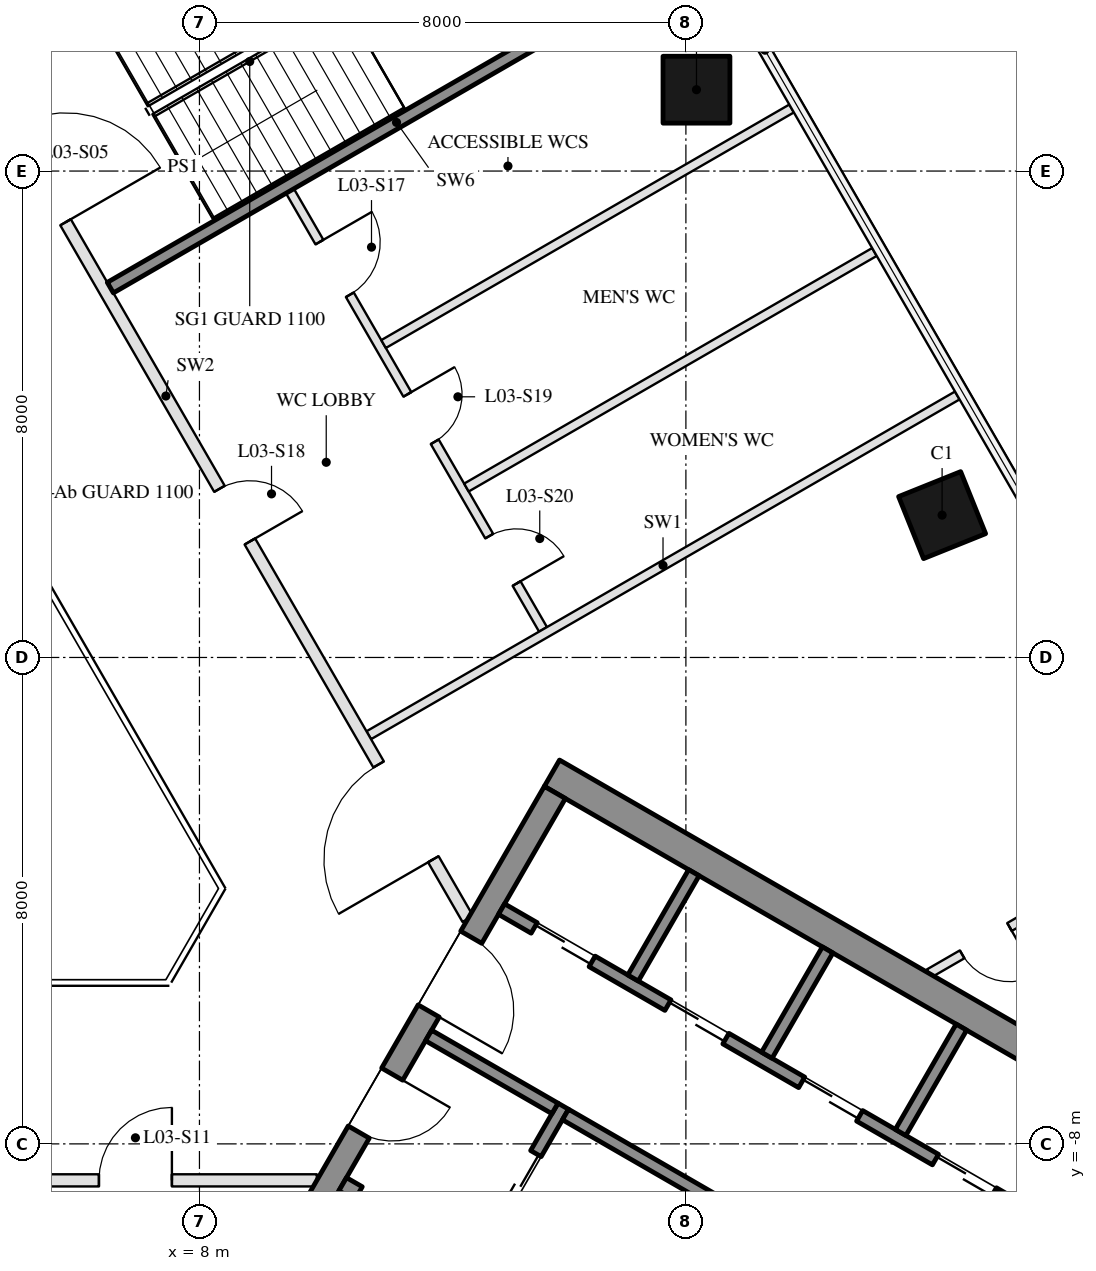
"""IFC4 building model, lengths in metres.
Left out: names, types, materials, properties, quantities, classifications, styles, units other than length and angle.
Written with IfcOpenShell. Run it as: python <this file> out.ifc"""

import sys

from ifc_helpers import new_model, si_unit, direction, frame, frame_2d, origin, origin_2d, place, context, subcontext, project, spatial, rectangle, hollow_rectangle, extrude, boolean, halfspace, element, fill, save


model = new_model("IFC4")
c1 = context("Model", 3, precision=1e-05, world=origin(), true_north=direction((0.0, 1.0)))
c2 = subcontext(c1, "Body", "Model", "MODEL_VIEW")
j1 = project(units=[si_unit("LENGTHUNIT", "METRE"), si_unit("PLANEANGLEUNIT", "RADIAN")], contexts=[c1])
p1 = place(None, origin())
s1 = spatial("IfcSite", under=j1, at=p1, CompositionType="ELEMENT")
p2 = place(p1, origin())
s2 = spatial("IfcBuilding", under=s1, at=p2, CompositionType="ELEMENT")
p3 = place(p2, frame((0.0, 0.0, 23.5)))
s3 = spatial("IfcBuildingStorey", under=s2, at=p3, CompositionType="ELEMENT", Elevation=23.5)
p4 = place(p3, frame((20.214, 2.341, 0.0), z_axis=(-0.055770669369, -0.007946345373, 0.998411983118), x_axis=(0.499656252381, -0.865968742186, 0.021018254285)))
e1 = element("IfcColumn", 1, at=p4, inside=s3, PredefinedType="COLUMN", context=c2, shape_type="SweptSolid", body=[
    boolean("DIFFERENCE", boolean("DIFFERENCE", extrude(hollow_rectangle(XDim=1.1, YDim=1.1, WallThickness=0.05, at=origin_2d()), origin(), (0.0, 0.0, 1.0), 5.008), halfspace(frame((0.0, 0.0, 0.014), z_axis=(0.0, 0.0, 1.0), x_axis=(1.0, 0.0, 0.0)), True)), halfspace(frame((0.0, 0.0, 4.997), z_axis=(0.0, 0.0, 1.0), x_axis=(1.0, 0.0, 0.0)), False)),
])
p5 = place(p3, frame((16.174, 9.338, 0.0), z_axis=(-0.045250647617, -0.026087388443, 0.99863498189), x_axis=(0.499528531793, -0.866297435009, 4.558094e-06)))
e2 = element("IfcColumn", 2, at=p5, inside=s3, PredefinedType="COLUMN", context=c2, shape_type="SweptSolid", body=[
    boolean("DIFFERENCE", boolean("DIFFERENCE", extrude(hollow_rectangle(XDim=1.1, YDim=1.1, WallThickness=0.05, at=origin_2d()), origin(), (0.0, 0.0, 1.0), 5.007), halfspace(frame((0.0, 0.0, 0.013), z_axis=(0.0, 0.0, 1.0), x_axis=(1.0, 0.0, 0.0)), True)), halfspace(frame((0.0, 0.0, 4.996), z_axis=(0.0, 0.0, 1.0), x_axis=(1.0, 0.0, 0.0)), False)),
])
p6 = place(p3, frame((13.797, -1.903, 0.0), z_axis=(0.0, 0.0, 1.0), x_axis=(0.866025760136, -0.499999382781, 0.0)))
e3 = element("IfcWall", 3, at=p6, inside=s3, PredefinedType="SHEAR", context=c2, shape_type="SweptSolid", body=[
    extrude(rectangle(XDim=15.542, YDim=0.5, at=frame_2d((7.771, 0.0))), origin(), (0.0, 0.0, 1.0), 4.7),
])
p7 = place(p3, frame((8.845, -10.88, 0.0), z_axis=(0.0, 0.0, 1.0), x_axis=(0.500004234368, 0.866022959057, 0.0)))
e4 = element("IfcWall", 4, at=p7, inside=s3, PredefinedType="SHEAR", context=c2, shape_type="SweptSolid", body=[
    extrude(rectangle(XDim=10.0, YDim=0.4, at=frame_2d((5.0, 0.0))), origin(), (0.0, 0.0, 1.0), 4.7),
])
p8 = place(p7, frame((3.55, 0.0, 0.0)))
e5 = element("IfcOpeningElement", 5, at=p8, cuts=e4, PredefinedType="OPENING", context=c2, shape_type="SweptSolid", body=[
    extrude(rectangle(XDim=1.1, YDim=2.1, at=frame_2d((0.55, 1.05))), frame((0.0, 0.21, 0.0), z_axis=(0.0, -1.0, 0.0), x_axis=(1.0, 0.0, 0.0)), (0.0, 0.0, 1.0), 0.42),
])
p9 = place(p7, frame((5.85, 0.0, 0.0)))
e6 = element("IfcOpeningElement", 6, at=p9, cuts=e4, PredefinedType="OPENING", context=c2, shape_type="SweptSolid", body=[
    extrude(rectangle(XDim=1.4, YDim=2.1, at=frame_2d((0.7, 1.05))), frame((0.0, 0.21, 0.0), z_axis=(0.0, -1.0, 0.0), x_axis=(1.0, 0.0, 0.0)), (0.0, 0.0, 1.0), 0.42),
])
p10 = place(p3, frame((10.356, -8.664, 0.0), z_axis=(0.0, 0.0, 1.0), x_axis=(0.866028629588, -0.499994412703, 0.0)))
e7 = element("IfcWall", 7, at=p10, inside=s3, PredefinedType="SHEAR", context=c2, shape_type="SweptSolid", body=[
    extrude(rectangle(XDim=6.45, YDim=0.25, at=frame_2d((3.225, 0.0))), origin(), (0.0, 0.0, 1.0), 4.7),
])
p11 = place(p10, frame((0.3, 0.0, 0.0)))
e8 = element("IfcOpeningElement", 8, at=p11, cuts=e7, PredefinedType="OPENING", context=c2, shape_type="SweptSolid", body=[
    extrude(rectangle(XDim=1.0, YDim=2.1, at=frame_2d((0.5, 1.05))), frame((0.0, 0.135, 0.0), z_axis=(0.0, -1.0, 0.0), x_axis=(1.0, 0.0, 0.0)), (0.0, 0.0, 1.0), 0.27),
])
p12 = place(p3, frame((12.583, -9.805, 0.0), z_axis=(0.0, 0.0, 1.0), x_axis=(0.49994636267, 0.866056369097, 0.0)))
e9 = element("IfcWall", 9, at=p12, inside=s3, PredefinedType="SHEAR", context=c2, shape_type="SweptSolid", body=[
    extrude(rectangle(XDim=2.8, YDim=0.2, at=frame_2d((1.4, 0.0))), origin(), (0.0, 0.0, 1.0), 4.7),
])
p13 = place(p12, frame((0.7, 0.0, 0.0)))
e10 = element("IfcOpeningElement", 10, at=p13, cuts=e9, PredefinedType="OPENING", context=c2, shape_type="SweptSolid", body=[
    extrude(rectangle(XDim=1.2, YDim=2.1, at=frame_2d((0.6, 1.05))), frame((0.0, 0.11, 0.0), z_axis=(0.0, -1.0, 0.0), x_axis=(1.0, 0.0, 0.0)), (0.0, 0.0, 1.0), 0.22),
])
p14 = place(p3, frame((11.768, -6.217, 0.0), z_axis=(0.0, 0.0, 1.0), x_axis=(0.866050077142, -0.499957262057, 0.0)))
e11 = element("IfcWall", 11, at=p14, inside=s3, PredefinedType="SHEAR", context=c2, shape_type="SweptSolid", body=[
    extrude(rectangle(XDim=2.4, YDim=0.2, at=frame_2d((1.2, 0.0))), origin(), (0.0, 0.0, 1.0), 4.7),
])
p15 = place(p3, frame((14.02, -7.517, 0.0), z_axis=(0.0, 0.0, 1.0), x_axis=(0.866034573852, -0.49998411664, 0.0)))
e12 = element("IfcWall", 12, at=p15, inside=s3, PredefinedType="SHEAR", context=c2, shape_type="SweptSolid", body=[
    extrude(rectangle(XDim=2.8, YDim=0.2, at=frame_2d((1.4, 0.0))), origin(), (0.0, 0.0, 1.0), 4.7),
])
p16 = place(p3, frame((12.968, -4.138, 0.0), z_axis=(0.0, 0.0, 1.0), x_axis=(0.866028328073, -0.49999493495, 0.0)))
e13 = element("IfcWall", 13, at=p16, inside=s3, PredefinedType="SHEAR", context=c2, shape_type="SweptSolid", body=[
    extrude(rectangle(XDim=10.16, YDim=0.2, at=frame_2d((5.08, 0.0))), origin(), (0.0, 0.0, 1.0), 4.7),
])
p17 = place(p16, frame((0.62, 0.0, 0.0)))
e14 = element("IfcOpeningElement", 14, at=p17, cuts=e13, PredefinedType="OPENING", context=c2, shape_type="SweptSolid", body=[
    extrude(rectangle(XDim=1.1, YDim=2.1, at=frame_2d((0.55, 1.05))), frame((0.0, 0.11, 0.0), z_axis=(0.0, -1.0, 0.0), x_axis=(1.0, 0.0, 0.0)), (0.0, 0.0, 1.0), 0.22),
])
p18 = place(p16, frame((3.16, 0.0, 0.0)))
e15 = element("IfcOpeningElement", 15, at=p18, cuts=e13, PredefinedType="OPENING", context=c2, shape_type="SweptSolid", body=[
    extrude(rectangle(XDim=1.1, YDim=2.1, at=frame_2d((0.55, 1.05))), frame((0.0, 0.11, 0.0), z_axis=(0.0, -1.0, 0.0), x_axis=(1.0, 0.0, 0.0)), (0.0, 0.0, 1.0), 0.22),
])
p19 = place(p16, frame((5.7, 0.0, 0.0)))
e16 = element("IfcOpeningElement", 16, at=p19, cuts=e13, PredefinedType="OPENING", context=c2, shape_type="SweptSolid", body=[
    extrude(rectangle(XDim=1.1, YDim=2.1, at=frame_2d((0.55, 1.05))), frame((0.0, 0.11, 0.0), z_axis=(0.0, -1.0, 0.0), x_axis=(1.0, 0.0, 0.0)), (0.0, 0.0, 1.0), 0.22),
])
p20 = place(p16, frame((8.24, 0.0, 0.0)))
e17 = element("IfcOpeningElement", 17, at=p20, cuts=e13, PredefinedType="OPENING", context=c2, shape_type="SweptSolid", body=[
    extrude(rectangle(XDim=1.1, YDim=2.1, at=frame_2d((0.55, 1.05))), frame((0.0, 0.11, 0.0), z_axis=(0.0, -1.0, 0.0), x_axis=(1.0, 0.0, 0.0)), (0.0, 0.0, 1.0), 0.22),
])
for number, where, z_axis, x_axis in (
    (18, (15.131, -5.272, 0.0), (0.0, 0.0, 1.0), (0.5, 0.866, 0.0)),
    (19, (17.331, -6.542, 0.0), (0.0, 0.0, 1.0), (0.5, 0.866, 0.0)),
    (20, (19.531, -7.812, 0.0), (0.0, 0.0, 1.0), (0.5, 0.866, 0.0)),
):
    element("IfcWall", number, at=place(p3, frame(where, z_axis=z_axis, x_axis=x_axis)), inside=s3, PredefinedType="SHEAR", context=c2, shape_type="SweptSolid", body=[
        extrude(rectangle(XDim=2.0, YDim=0.2, at=frame_2d((1.0, 0.0))), origin(), (0.0, 0.0, 1.0), 4.7),
    ])
p21 = place(p3, frame((-9.93, -8.6, 0.0), z_axis=(0.0, 0.0, 1.0), x_axis=(1.0, 0.0, 0.0)))
e21 = element("IfcWall", 21, at=p21, inside=s3, PredefinedType="PARTITIONING", context=c2, shape_type="SweptSolid", body=[
    extrude(rectangle(XDim=19.861, YDim=0.2, at=frame_2d((9.93, 0.0))), origin(), (0.0, 0.0, 1.0), 3.91),
])
p22 = place(p21, frame((1.734, 0.0, 0.0)))
e22 = element("IfcOpeningElement", 22, at=p22, cuts=e21, PredefinedType="OPENING", context=c2, shape_type="SweptSolid", body=[
    extrude(rectangle(XDim=1.0, YDim=2.1, at=frame_2d((0.5, 1.05))), frame((0.0, 0.11, 0.0), z_axis=(0.0, -1.0, 0.0), x_axis=(1.0, 0.0, 0.0)), (0.0, 0.0, 1.0), 0.22),
])
p23 = place(p21, frame((6.081, 0.0, 0.0)))
e23 = element("IfcOpeningElement", 23, at=p23, cuts=e21, PredefinedType="OPENING", context=c2, shape_type="SweptSolid", body=[
    extrude(rectangle(XDim=1.0, YDim=2.1, at=frame_2d((0.5, 1.05))), frame((0.0, 0.11, 0.0), z_axis=(0.0, -1.0, 0.0), x_axis=(1.0, 0.0, 0.0)), (0.0, 0.0, 1.0), 0.22),
])
p24 = place(p21, frame((10.831, 0.0, 0.0)))
e24 = element("IfcOpeningElement", 24, at=p24, cuts=e21, PredefinedType="OPENING", context=c2, shape_type="SweptSolid", body=[
    extrude(rectangle(XDim=1.0, YDim=2.1, at=frame_2d((0.5, 1.05))), frame((0.0, 0.11, 0.0), z_axis=(0.0, -1.0, 0.0), x_axis=(1.0, 0.0, 0.0)), (0.0, 0.0, 1.0), 0.22),
])
p25 = place(p21, frame((16.278, 0.0, 0.0)))
e25 = element("IfcOpeningElement", 25, at=p25, cuts=e21, PredefinedType="OPENING", context=c2, shape_type="SweptSolid", body=[
    extrude(rectangle(XDim=1.2, YDim=2.1, at=frame_2d((0.6, 1.05))), frame((0.0, 0.11, 0.0), z_axis=(0.0, -1.0, 0.0), x_axis=(1.0, 0.0, 0.0)), (0.0, 0.0, 1.0), 0.22),
])
p26 = place(p3, frame((13.65, 0.462, 0.0), z_axis=(0.0, 0.0, 1.0), x_axis=(-0.499983926186, 0.866034683806, 0.0)))
e26 = element("IfcWall", 26, at=p26, inside=s3, PredefinedType="PARTITIONING", context=c2, shape_type="SweptSolid", body=[
    extrude(rectangle(XDim=8.325, YDim=0.15, at=frame_2d((4.163, 0.0))), origin(), (0.0, 0.0, 1.0), 3.91),
])
p27 = place(p26, frame((6.354, 0.0, 0.0)))
e27 = element("IfcOpeningElement", 27, at=p27, cuts=e26, PredefinedType="OPENING", context=c2, shape_type="SweptSolid", body=[
    extrude(rectangle(XDim=1.0, YDim=2.1, at=frame_2d((0.5, 1.05))), frame((0.0, 0.085, 0.0), z_axis=(0.0, -1.0, 0.0), x_axis=(1.0, 0.0, 0.0)), (0.0, 0.0, 1.0), 0.17),
])
p28 = place(p26, frame((3.562, 0.0, 0.0)))
e28 = element("IfcOpeningElement", 28, at=p28, cuts=e26, PredefinedType="OPENING", context=c2, shape_type="SweptSolid", body=[
    extrude(rectangle(XDim=0.9, YDim=2.1, at=frame_2d((0.45, 1.05))), frame((0.0, 0.085, 0.0), z_axis=(0.0, -1.0, 0.0), x_axis=(1.0, 0.0, 0.0)), (0.0, 0.0, 1.0), 0.17),
])
p29 = place(p26, frame((0.871, 0.0, 0.0)))
e29 = element("IfcOpeningElement", 29, at=p29, cuts=e26, PredefinedType="OPENING", context=c2, shape_type="SweptSolid", body=[
    extrude(rectangle(XDim=0.9, YDim=2.1, at=frame_2d((0.45, 1.05))), frame((0.0, 0.085, 0.0), z_axis=(0.0, -1.0, 0.0), x_axis=(1.0, 0.0, 0.0)), (0.0, 0.0, 1.0), 0.17),
])
p30 = place(p3, frame((24.463, -2.619, 0.0), z_axis=(0.0, 0.0, 1.0), x_axis=(-0.866015973267, -0.50001633378, 0.0)))
e30 = element("IfcWall", 30, at=p30, inside=s3, PredefinedType="PARTITIONING", context=c2, shape_type="SweptSolid", body=[
    extrude(rectangle(XDim=5.154, YDim=0.15, at=frame_2d((2.577, 0.0))), origin(), (0.0, 0.0, 1.0), 4.1),
])
p31 = place(p30, frame((3.627, 0.0, 0.0)))
e31 = element("IfcOpeningElement", 31, at=p31, cuts=e30, PredefinedType="OPENING", context=c2, shape_type="SweptSolid", body=[
    extrude(rectangle(XDim=0.9, YDim=2.1, at=frame_2d((0.45, 1.05))), frame((0.0, 0.085, 0.0), z_axis=(0.0, -1.0, 0.0), x_axis=(1.0, 0.0, 0.0)), (0.0, 0.0, 1.0), 0.17),
])
p32 = place(p3, frame((20.463, 4.309, 0.0), z_axis=(0.0, 0.0, 1.0), x_axis=(-0.866020428917, -0.500008616625, 0.0)))
e32 = element("IfcWall", 32, at=p32, inside=s3, PredefinedType="PARTITIONING", context=c2, shape_type="SweptSolid", body=[
    extrude(rectangle(XDim=11.176, YDim=0.15, at=frame_2d((5.588, 0.0))), origin(), (0.0, 0.0, 1.0), 4.1),
])
p33 = place(p3, frame((19.101, 6.669, 0.0), z_axis=(0.0, 0.0, 1.0), x_axis=(-0.866031845665, -0.499988842169, 0.0)))
e33 = element("IfcWall", 33, at=p33, inside=s3, PredefinedType="PARTITIONING", context=c2, shape_type="SweptSolid", body=[
    extrude(rectangle(XDim=7.748, YDim=0.15, at=frame_2d((3.874, 0.0))), origin(), (0.0, 0.0, 1.0), 3.91),
])
p34 = place(p3, frame((17.738, 9.029, 0.0), z_axis=(0.0, 0.0, 1.0), x_axis=(-0.866010323949, -0.500026118132, 0.0)))
e34 = element("IfcWall", 34, at=p34, inside=s3, PredefinedType="PARTITIONING", context=c2, shape_type="SweptSolid", body=[
    extrude(rectangle(XDim=7.748, YDim=0.15, at=frame_2d((3.874, 0.0))), origin(), (0.0, 0.0, 1.0), 4.1),
])
for number, where, z_axis, x_axis in (
    (35, (15.948, 11.517, 0.0), (0.0, 0.0, 1.0), (-0.866, -0.5, 0.0)),
    (36, (13.748, 15.328, 0.0), (0.0, 0.0, 1.0), (-0.866, -0.5, 0.0)),
):
    element("IfcWall", number, at=place(p3, frame(where, z_axis=z_axis, x_axis=x_axis)), inside=s3, PredefinedType="SOLIDWALL", context=c2, shape_type="SweptSolid", body=[
        extrude(rectangle(XDim=10.87, YDim=0.2, at=frame_2d((5.435, 0.0))), origin(), (0.0, 0.0, 1.0), 4.7),
    ])
p35 = place(p3, frame((12.413, -4.3, 0.0), z_axis=(0.0, 0.0, 1.0), x_axis=(-0.50000478328, 0.866022642139, 0.0)))
e37 = element("IfcWall", 37, at=p35, inside=s3, PredefinedType="PARTITIONING", context=c2, shape_type="SweptSolid", body=[
    extrude(rectangle(XDim=19.861, YDim=0.2, at=frame_2d((9.931, 0.0))), origin(), (0.0, 0.0, 1.0), 3.91),
])
p36 = place(p35, frame((1.134, 0.0, 0.0)))
e38 = element("IfcOpeningElement", 38, at=p36, cuts=e37, PredefinedType="OPENING", context=c2, shape_type="SweptSolid", body=[
    extrude(rectangle(XDim=1.8, YDim=2.4, at=frame_2d((0.9, 1.2))), frame((0.0, 0.11, 0.0), z_axis=(0.0, -1.0, 0.0), x_axis=(1.0, 0.0, 0.0)), (0.0, 0.0, 1.0), 0.22),
])
p37 = place(p35, frame((17.59, 0.0, 0.0)))
e39 = element("IfcOpeningElement", 39, at=p37, cuts=e37, PredefinedType="OPENING", context=c2, shape_type="SweptSolid", body=[
    extrude(rectangle(XDim=1.0, YDim=2.1, at=frame_2d((0.5, 1.05))), frame((0.0, 0.11, 0.0), z_axis=(0.0, -1.0, 0.0), x_axis=(1.0, 0.0, 0.0)), (0.0, 0.0, 1.0), 0.22),
])
p38 = place(p35, frame((13.23, 0.0, 0.0)))
e40 = element("IfcOpeningElement", 40, at=p38, cuts=e37, PredefinedType="OPENING", context=c2, shape_type="SweptSolid", body=[
    extrude(rectangle(XDim=1.8, YDim=2.1, at=frame_2d((0.9, 1.05))), frame((0.0, 0.11, 0.0), z_axis=(0.0, -1.0, 0.0), x_axis=(1.0, 0.0, 0.0)), (0.0, 0.0, 1.0), 0.22),
])
p39 = place(p35, frame((7.168, 0.0, 0.0)))
e41 = element("IfcOpeningElement", 41, at=p39, cuts=e37, PredefinedType="OPENING", context=c2, shape_type="SweptSolid", body=[
    extrude(rectangle(XDim=1.0, YDim=2.1, at=frame_2d((0.5, 1.05))), frame((0.0, 0.11, 0.0), z_axis=(0.0, -1.0, 0.0), x_axis=(1.0, 0.0, 0.0)), (0.0, 0.0, 1.0), 0.22),
])
p40 = place(p13, origin())
e42 = element("IfcDoor", 42, at=p40, inside=s3, OperationType="DOUBLE_DOOR_SLIDING", PredefinedType="DOOR", context=c2, shape_type="SweptSolid", body=[
    extrude(rectangle(XDim=1.2, YDim=2.1, at=frame_2d((0.6, 1.05))), frame((0.0, 0.025, 0.0), z_axis=(0.0, -1.0, 0.0), x_axis=(1.0, 0.0, 0.0)), (0.0, 0.0, 1.0), 0.05),
])
fill(e10, e42)
p41 = place(p17, origin())
e43 = element("IfcDoor", 43, at=p41, inside=s3, OperationType="DOUBLE_DOOR_SLIDING", PredefinedType="DOOR", context=c2, shape_type="SweptSolid", body=[
    extrude(rectangle(XDim=1.1, YDim=2.1, at=frame_2d((0.55, 1.05))), frame((0.0, 0.025, 0.0), z_axis=(0.0, -1.0, 0.0), x_axis=(1.0, 0.0, 0.0)), (0.0, 0.0, 1.0), 0.05),
])
fill(e14, e43)
p42 = place(p18, origin())
e44 = element("IfcDoor", 44, at=p42, inside=s3, OperationType="DOUBLE_DOOR_SLIDING", PredefinedType="DOOR", context=c2, shape_type="SweptSolid", body=[
    extrude(rectangle(XDim=1.1, YDim=2.1, at=frame_2d((0.55, 1.05))), frame((0.0, 0.025, 0.0), z_axis=(0.0, -1.0, 0.0), x_axis=(1.0, 0.0, 0.0)), (0.0, 0.0, 1.0), 0.05),
])
fill(e15, e44)
p43 = place(p19, origin())
e45 = element("IfcDoor", 45, at=p43, inside=s3, OperationType="DOUBLE_DOOR_SLIDING", PredefinedType="DOOR", context=c2, shape_type="SweptSolid", body=[
    extrude(rectangle(XDim=1.1, YDim=2.1, at=frame_2d((0.55, 1.05))), frame((0.0, 0.025, 0.0), z_axis=(0.0, -1.0, 0.0), x_axis=(1.0, 0.0, 0.0)), (0.0, 0.0, 1.0), 0.05),
])
fill(e16, e45)
p44 = place(p20, origin())
e46 = element("IfcDoor", 46, at=p44, inside=s3, OperationType="DOUBLE_DOOR_SLIDING", PredefinedType="DOOR", context=c2, shape_type="SweptSolid", body=[
    extrude(rectangle(XDim=1.1, YDim=2.1, at=frame_2d((0.55, 1.05))), frame((0.0, 0.025, 0.0), z_axis=(0.0, -1.0, 0.0), x_axis=(1.0, 0.0, 0.0)), (0.0, 0.0, 1.0), 0.05),
])
fill(e17, e46)
p45 = place(p8, frame((1.1, 0.0, 0.0), z_axis=(0.0, 0.0, 1.0), x_axis=(-1.0, 0.0, 0.0)))
e47 = element("IfcDoor", 47, at=p45, inside=s3, OperationType="SINGLE_SWING_LEFT", PredefinedType="DOOR", context=c2, shape_type="SweptSolid", body=[
    extrude(rectangle(XDim=1.1, YDim=2.1, at=frame_2d((0.55, 1.05))), frame((0.0, 0.025, 0.0), z_axis=(0.0, -1.0, 0.0), x_axis=(1.0, 0.0, 0.0)), (0.0, 0.0, 1.0), 0.05),
])
fill(e5, e47)
p46 = place(p9, frame((1.4, 0.0, 0.0), z_axis=(0.0, 0.0, 1.0), x_axis=(-1.0, 0.0, 0.0)))
e48 = element("IfcDoor", 48, at=p46, inside=s3, OperationType="DOUBLE_DOOR_SINGLE_SWING", PredefinedType="DOOR", context=c2, shape_type="SweptSolid", body=[
    extrude(rectangle(XDim=1.4, YDim=2.1, at=frame_2d((0.7, 1.05))), frame((0.0, 0.025, 0.0), z_axis=(0.0, -1.0, 0.0), x_axis=(1.0, 0.0, 0.0)), (0.0, 0.0, 1.0), 0.05),
])
fill(e6, e48)
p47 = place(p36, origin())
e49 = element("IfcDoor", 49, at=p47, inside=s3, OperationType="DOUBLE_DOOR_SINGLE_SWING", PredefinedType="DOOR", context=c2, shape_type="SweptSolid", body=[
    extrude(rectangle(XDim=1.8, YDim=2.4, at=frame_2d((0.9, 1.2))), frame((0.0, 0.025, 0.0), z_axis=(0.0, -1.0, 0.0), x_axis=(1.0, 0.0, 0.0)), (0.0, 0.0, 1.0), 0.05),
])
fill(e38, e49)
p48 = place(p31, origin())
e50 = element("IfcDoor", 50, at=p48, inside=s3, OperationType="SINGLE_SWING_LEFT", PredefinedType="DOOR", context=c2, shape_type="SweptSolid", body=[
    extrude(rectangle(XDim=0.9, YDim=2.1, at=frame_2d((0.45, 1.05))), frame((0.0, 0.025, 0.0), z_axis=(0.0, -1.0, 0.0), x_axis=(1.0, 0.0, 0.0)), (0.0, 0.0, 1.0), 0.05),
])
fill(e31, e50)
p49 = place(p38, frame((1.8, 0.0, 0.0), z_axis=(0.0, 0.0, 1.0), x_axis=(-1.0, 0.0, 0.0)))
e51 = element("IfcDoor", 51, at=p49, inside=s3, OperationType="DOUBLE_DOOR_SINGLE_SWING", PredefinedType="DOOR", context=c2, shape_type="SweptSolid", body=[
    extrude(rectangle(XDim=1.8, YDim=2.1, at=frame_2d((0.9, 1.05))), frame((0.0, 0.025, 0.0), z_axis=(0.0, -1.0, 0.0), x_axis=(1.0, 0.0, 0.0)), (0.0, 0.0, 1.0), 0.05),
])
fill(e40, e51)
p50 = place(p25, origin())
e52 = element("IfcDoor", 52, at=p50, inside=s3, OperationType="SINGLE_SWING_RIGHT", PredefinedType="DOOR", context=c2, shape_type="SweptSolid", body=[
    extrude(rectangle(XDim=1.2, YDim=2.1, at=frame_2d((0.6, 1.05))), frame((0.0, 0.025, 0.0), z_axis=(0.0, -1.0, 0.0), x_axis=(1.0, 0.0, 0.0)), (0.0, 0.0, 1.0), 0.05),
])
fill(e25, e52)
p51 = place(p27, frame((1.0, 0.0, 0.0), z_axis=(0.0, 0.0, 1.0), x_axis=(-1.0, 0.0, 0.0)))
e53 = element("IfcDoor", 53, at=p51, inside=s3, OperationType="SINGLE_SWING_LEFT", PredefinedType="DOOR", context=c2, shape_type="SweptSolid", body=[
    extrude(rectangle(XDim=1.0, YDim=2.1, at=frame_2d((0.5, 1.05))), frame((0.0, 0.025, 0.0), z_axis=(0.0, -1.0, 0.0), x_axis=(1.0, 0.0, 0.0)), (0.0, 0.0, 1.0), 0.05),
])
fill(e27, e53)
p52 = place(p39, frame((1.0, 0.0, 0.0), z_axis=(0.0, 0.0, 1.0), x_axis=(-1.0, 0.0, 0.0)))
e54 = element("IfcDoor", 54, at=p52, inside=s3, OperationType="SINGLE_SWING_RIGHT", PredefinedType="DOOR", context=c2, shape_type="SweptSolid", body=[
    extrude(rectangle(XDim=1.0, YDim=2.1, at=frame_2d((0.5, 1.05))), frame((0.0, 0.025, 0.0), z_axis=(0.0, -1.0, 0.0), x_axis=(1.0, 0.0, 0.0)), (0.0, 0.0, 1.0), 0.05),
])
fill(e41, e54)
p53 = place(p28, frame((0.9, 0.0, 0.0), z_axis=(0.0, 0.0, 1.0), x_axis=(-1.0, 0.0, 0.0)))
e55 = element("IfcDoor", 55, at=p53, inside=s3, OperationType="SINGLE_SWING_LEFT", PredefinedType="DOOR", context=c2, shape_type="SweptSolid", body=[
    extrude(rectangle(XDim=0.9, YDim=2.1, at=frame_2d((0.45, 1.05))), frame((0.0, 0.025, 0.0), z_axis=(0.0, -1.0, 0.0), x_axis=(1.0, 0.0, 0.0)), (0.0, 0.0, 1.0), 0.05),
])
fill(e28, e55)
p54 = place(p29, frame((0.9, 0.0, 0.0), z_axis=(0.0, 0.0, 1.0), x_axis=(-1.0, 0.0, 0.0)))
e56 = element("IfcDoor", 56, at=p54, inside=s3, OperationType="SINGLE_SWING_RIGHT", PredefinedType="DOOR", context=c2, shape_type="SweptSolid", body=[
    extrude(rectangle(XDim=0.9, YDim=2.1, at=frame_2d((0.45, 1.05))), frame((0.0, 0.025, 0.0), z_axis=(0.0, -1.0, 0.0), x_axis=(1.0, 0.0, 0.0)), (0.0, 0.0, 1.0), 0.05),
])
fill(e29, e56)
save(model, sys.argv[1])
